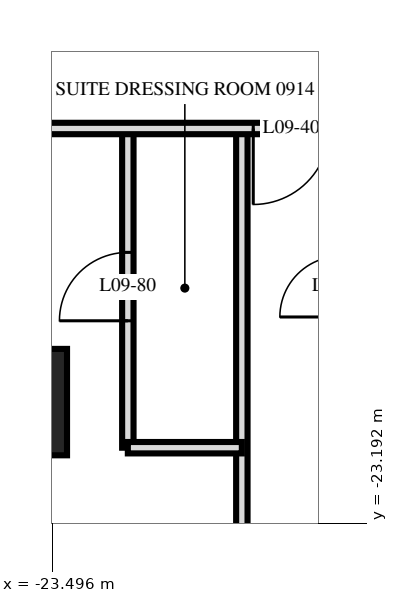
"""IFC4 building model, lengths in metres.
Left out: names, types, materials, properties, quantities, classifications, styles, units other than length and angle.
Written with IfcOpenShell. Run it as: python <this file> out.ifc"""

import sys

from ifc_helpers import new_model, si_unit, direction, frame, frame_2d, origin, origin_2d, place, context, subcontext, project, spatial, rectangle, extrude, element, fill, save


model = new_model("IFC4")
c1 = context("Model", 3, precision=1e-05, world=origin(), true_north=direction((0.0, 1.0)))
c2 = subcontext(c1, "Body", "Model", "MODEL_VIEW")
j1 = project(units=[si_unit("LENGTHUNIT", "METRE"), si_unit("PLANEANGLEUNIT", "RADIAN")], contexts=[c1])
p1 = place(None, origin())
s1 = spatial("IfcSite", under=j1, at=p1, CompositionType="ELEMENT")
p2 = place(p1, origin())
s2 = spatial("IfcBuilding", under=s1, at=p2, CompositionType="ELEMENT")
p3 = place(p2, frame((0.0, 0.0, 42.0)))
s3 = spatial("IfcBuildingStorey", under=s2, at=p3, CompositionType="ELEMENT", Elevation=42.0)
p4 = place(p3, frame((-24.0, -21.6, 0.0), z_axis=(0.0, 0.0, 1.0), x_axis=(1.0, 0.0, 0.0)))
e1 = element("IfcColumn", 1, at=p4, inside=s3, PredefinedType="COLUMN", context=c2, shape_type="SweptSolid", body=[
    extrude(rectangle(XDim=1.4, YDim=1.4, at=origin_2d()), origin(), (0.0, 0.0, 1.0), 3.6),
])
p5 = place(p3, frame((-21.0, -29.22, 0.0), z_axis=(0.0, 0.0, 1.0), x_axis=(0.0, 1.0, 0.0)))
e2 = element("IfcWall", 2, at=p5, inside=s3, PredefinedType="PARTITIONING", context=c2, shape_type="SweptSolid", body=[
    extrude(rectangle(XDim=11.22, YDim=0.15, at=frame_2d((5.61, 0.0))), origin(), (0.0, 0.0, 1.0), 3.32),
])
p6 = place(p3, frame((-22.5, -22.2, 0.0), z_axis=(0.0, 0.0, 1.0), x_axis=(0.0, 1.0, 0.0)))
e3 = element("IfcWall", 3, at=p6, inside=s3, PredefinedType="PARTITIONING", context=c2, shape_type="SweptSolid", body=[
    extrude(rectangle(XDim=4.2, YDim=0.15, at=frame_2d((2.1, 0.0))), origin(), (0.0, 0.0, 1.0), 3.32),
])
p7 = place(p6, frame((1.67, 0.0, 0.0)))
e4 = element("IfcOpeningElement", 4, at=p7, cuts=e3, PredefinedType="OPENING", context=c2, shape_type="SweptSolid", body=[
    extrude(rectangle(XDim=0.9, YDim=2.1, at=frame_2d((0.45, 1.05))), frame((0.0, 0.085, 0.0), z_axis=(0.0, -1.0, 0.0), x_axis=(1.0, 0.0, 0.0)), (0.0, 0.0, 1.0), 0.17),
])
p8 = place(p3, frame((-22.5, -22.2, 0.0), z_axis=(0.0, 0.0, 1.0), x_axis=(1.0, 0.0, 0.0)))
e5 = element("IfcWall", 5, at=p8, inside=s3, PredefinedType="PARTITIONING", context=c2, shape_type="SweptSolid", body=[
    extrude(rectangle(XDim=1.5, YDim=0.15, at=frame_2d((0.75, 0.0))), origin(), (0.0, 0.0, 1.0), 3.32),
])
p9 = place(p3, frame((-33.12, -18.0, 0.0), z_axis=(0.0, 0.0, 1.0), x_axis=(1.0, 0.0, 0.0)))
e6 = element("IfcWall", 6, at=p9, inside=s3, PredefinedType="PARTITIONING", context=c2, shape_type="SweptSolid", body=[
    extrude(rectangle(XDim=66.24, YDim=0.15, at=frame_2d((33.12, 0.0))), origin(), (0.0, 0.0, 1.0), 3.32),
])
p10 = place(p9, frame((12.27, 0.0, 0.0)))
e7 = element("IfcOpeningElement", 7, at=p10, cuts=e6, PredefinedType="OPENING", context=c2, shape_type="SweptSolid", body=[
    extrude(rectangle(XDim=1.0, YDim=2.1, at=frame_2d((0.5, 1.05))), frame((0.0, 0.085, 0.0), z_axis=(0.0, -1.0, 0.0), x_axis=(1.0, 0.0, 0.0)), (0.0, 0.0, 1.0), 0.17),
])
p11 = place(p9, frame((16.97, 0.0, 0.0)))
e8 = element("IfcOpeningElement", 8, at=p11, cuts=e6, PredefinedType="OPENING", context=c2, shape_type="SweptSolid", body=[
    extrude(rectangle(XDim=1.0, YDim=2.1, at=frame_2d((0.5, 1.05))), frame((0.0, 0.085, 0.0), z_axis=(0.0, -1.0, 0.0), x_axis=(1.0, 0.0, 0.0)), (0.0, 0.0, 1.0), 0.17),
])
p12 = place(p9, frame((18.27, 0.0, 0.0)))
e9 = element("IfcOpeningElement", 9, at=p12, cuts=e6, PredefinedType="OPENING", context=c2, shape_type="SweptSolid", body=[
    extrude(rectangle(XDim=1.0, YDim=2.1, at=frame_2d((0.5, 1.05))), frame((0.0, 0.085, 0.0), z_axis=(0.0, -1.0, 0.0), x_axis=(1.0, 0.0, 0.0)), (0.0, 0.0, 1.0), 0.17),
])
p13 = place(p9, frame((22.97, 0.0, 0.0)))
e10 = element("IfcOpeningElement", 10, at=p13, cuts=e6, PredefinedType="OPENING", context=c2, shape_type="SweptSolid", body=[
    extrude(rectangle(XDim=1.0, YDim=2.1, at=frame_2d((0.5, 1.05))), frame((0.0, 0.085, 0.0), z_axis=(0.0, -1.0, 0.0), x_axis=(1.0, 0.0, 0.0)), (0.0, 0.0, 1.0), 0.17),
])
p14 = place(p9, frame((24.27, 0.0, 0.0)))
e11 = element("IfcOpeningElement", 11, at=p14, cuts=e6, PredefinedType="OPENING", context=c2, shape_type="SweptSolid", body=[
    extrude(rectangle(XDim=1.0, YDim=2.1, at=frame_2d((0.5, 1.05))), frame((0.0, 0.085, 0.0), z_axis=(0.0, -1.0, 0.0), x_axis=(1.0, 0.0, 0.0)), (0.0, 0.0, 1.0), 0.17),
])
p15 = place(p9, frame((28.97, 0.0, 0.0)))
e12 = element("IfcOpeningElement", 12, at=p15, cuts=e6, PredefinedType="OPENING", context=c2, shape_type="SweptSolid", body=[
    extrude(rectangle(XDim=1.0, YDim=2.1, at=frame_2d((0.5, 1.05))), frame((0.0, 0.085, 0.0), z_axis=(0.0, -1.0, 0.0), x_axis=(1.0, 0.0, 0.0)), (0.0, 0.0, 1.0), 0.17),
])
p16 = place(p9, frame((30.27, 0.0, 0.0)))
e13 = element("IfcOpeningElement", 13, at=p16, cuts=e6, PredefinedType="OPENING", context=c2, shape_type="SweptSolid", body=[
    extrude(rectangle(XDim=1.0, YDim=2.1, at=frame_2d((0.5, 1.05))), frame((0.0, 0.085, 0.0), z_axis=(0.0, -1.0, 0.0), x_axis=(1.0, 0.0, 0.0)), (0.0, 0.0, 1.0), 0.17),
])
p17 = place(p9, frame((34.97, 0.0, 0.0)))
e14 = element("IfcOpeningElement", 14, at=p17, cuts=e6, PredefinedType="OPENING", context=c2, shape_type="SweptSolid", body=[
    extrude(rectangle(XDim=1.0, YDim=2.1, at=frame_2d((0.5, 1.05))), frame((0.0, 0.085, 0.0), z_axis=(0.0, -1.0, 0.0), x_axis=(1.0, 0.0, 0.0)), (0.0, 0.0, 1.0), 0.17),
])
p18 = place(p9, frame((37.27, 0.0, 0.0)))
e15 = element("IfcOpeningElement", 15, at=p18, cuts=e6, PredefinedType="OPENING", context=c2, shape_type="SweptSolid", body=[
    extrude(rectangle(XDim=1.0, YDim=2.1, at=frame_2d((0.5, 1.05))), frame((0.0, 0.085, 0.0), z_axis=(0.0, -1.0, 0.0), x_axis=(1.0, 0.0, 0.0)), (0.0, 0.0, 1.0), 0.17),
])
p19 = place(p9, frame((43.97, 0.0, 0.0)))
e16 = element("IfcOpeningElement", 16, at=p19, cuts=e6, PredefinedType="OPENING", context=c2, shape_type="SweptSolid", body=[
    extrude(rectangle(XDim=1.0, YDim=2.1, at=frame_2d((0.5, 1.05))), frame((0.0, 0.085, 0.0), z_axis=(0.0, -1.0, 0.0), x_axis=(1.0, 0.0, 0.0)), (0.0, 0.0, 1.0), 0.17),
])
p20 = place(p9, frame((45.27, 0.0, 0.0)))
e17 = element("IfcOpeningElement", 17, at=p20, cuts=e6, PredefinedType="OPENING", context=c2, shape_type="SweptSolid", body=[
    extrude(rectangle(XDim=1.0, YDim=2.1, at=frame_2d((0.5, 1.05))), frame((0.0, 0.085, 0.0), z_axis=(0.0, -1.0, 0.0), x_axis=(1.0, 0.0, 0.0)), (0.0, 0.0, 1.0), 0.17),
])
p21 = place(p9, frame((51.22, 0.0, 0.0)))
e18 = element("IfcOpeningElement", 18, at=p21, cuts=e6, PredefinedType="OPENING", context=c2, shape_type="SweptSolid", body=[
    extrude(rectangle(XDim=1.0, YDim=2.1, at=frame_2d((0.5, 1.05))), frame((0.0, 0.085, 0.0), z_axis=(0.0, -1.0, 0.0), x_axis=(1.0, 0.0, 0.0)), (0.0, 0.0, 1.0), 0.17),
])
p22 = place(p9, frame((54.27, 0.0, 0.0)))
e19 = element("IfcOpeningElement", 19, at=p22, cuts=e6, PredefinedType="OPENING", context=c2, shape_type="SweptSolid", body=[
    extrude(rectangle(XDim=1.0, YDim=2.1, at=frame_2d((0.5, 1.05))), frame((0.0, 0.085, 0.0), z_axis=(0.0, -1.0, 0.0), x_axis=(1.0, 0.0, 0.0)), (0.0, 0.0, 1.0), 0.17),
])
p23 = place(p9, frame((6.07, 0.0, 0.0)))
e20 = element("IfcOpeningElement", 20, at=p23, cuts=e6, PredefinedType="OPENING", context=c2, shape_type="SweptSolid", body=[
    extrude(rectangle(XDim=1.0, YDim=2.1, at=frame_2d((0.5, 1.05))), frame((0.0, 0.085, 0.0), z_axis=(0.0, -1.0, 0.0), x_axis=(1.0, 0.0, 0.0)), (0.0, 0.0, 1.0), 0.17),
])
p24 = place(p9, frame((63.37, 0.0, 0.0)))
e21 = element("IfcOpeningElement", 21, at=p24, cuts=e6, PredefinedType="OPENING", context=c2, shape_type="SweptSolid", body=[
    extrude(rectangle(XDim=1.0, YDim=2.1, at=frame_2d((0.5, 1.05))), frame((0.0, 0.085, 0.0), z_axis=(0.0, -1.0, 0.0), x_axis=(1.0, 0.0, 0.0)), (0.0, 0.0, 1.0), 0.17),
])
p25 = place(p10, frame((0.5, 0.0, 0.0), z_axis=(0.0, 0.0, 1.0), x_axis=(-1.0, 0.0, 0.0)))
e22 = element("IfcDoor", 22, at=p25, inside=s3, OperationType="SINGLE_SWING_LEFT", PredefinedType="DOOR", context=c2, shape_type="SweptSolid", body=[
    extrude(rectangle(XDim=1.0, YDim=2.1, at=frame_2d((0.0, 1.05))), frame((0.0, -0.025, 0.0), z_axis=(0.0, 1.0, 0.0), x_axis=(-1.0, 0.0, 0.0)), (0.0, 0.0, 1.0), 0.05),
])
fill(e7, e22)
p26 = place(p7, origin())
e23 = element("IfcDoor", 23, at=p26, inside=s3, OperationType="SINGLE_SWING_RIGHT", PredefinedType="DOOR", context=c2, shape_type="SweptSolid", body=[
    extrude(rectangle(XDim=0.9, YDim=2.1, at=frame_2d((0.45, 1.05))), frame((0.0, 0.025, 0.0), z_axis=(0.0, -1.0, 0.0), x_axis=(1.0, 0.0, 0.0)), (0.0, 0.0, 1.0), 0.05),
])
fill(e4, e23)
save(model, sys.argv[1])
